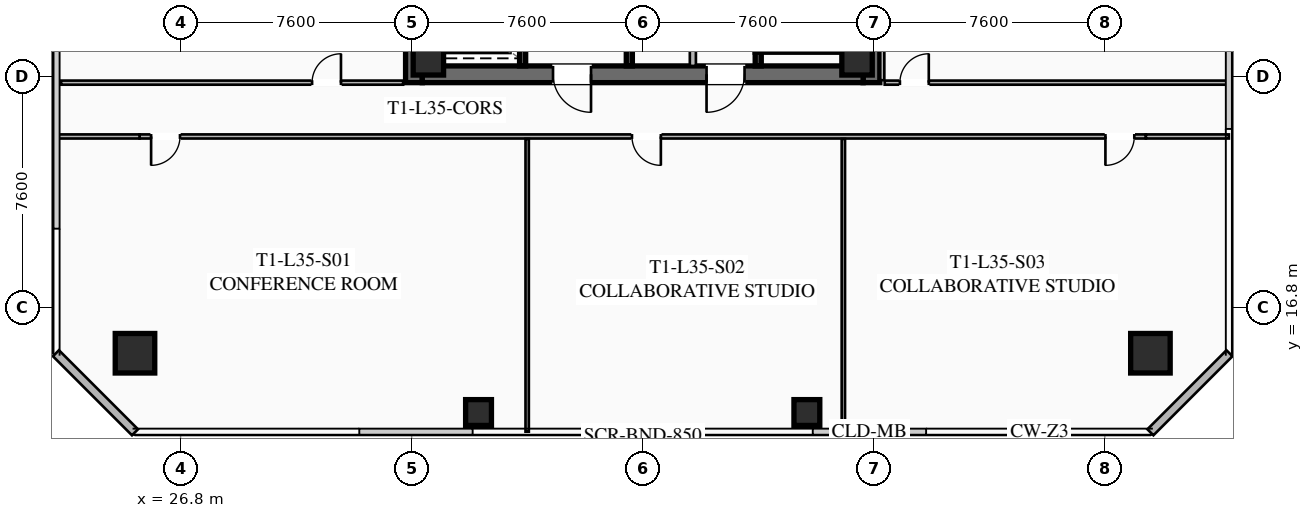
"""IFC4 building model, lengths in metres.
Left out: names, types, materials, properties, quantities, classifications, styles, units other than length and angle.
Written with IfcOpenShell. Run it as: python <this file> out.ifc"""

import sys

from ifc_helpers import new_model, si_unit, direction, frame, frame_2d, origin, origin_2d, place, context, subcontext, project, spatial, rectangle, hollow_rectangle, extrude, element, fill, save


model = new_model("IFC4")
c1 = context("Model", 3, precision=1e-05, world=origin(), true_north=direction((0.0, 1.0)))
c2 = subcontext(c1, "Body", "Model", "MODEL_VIEW")
j1 = project(units=[si_unit("LENGTHUNIT", "METRE"), si_unit("PLANEANGLEUNIT", "RADIAN")], contexts=[c1])
p1 = place(None, origin())
s1 = spatial("IfcSite", under=j1, at=p1, CompositionType="ELEMENT")
p2 = place(p1, origin())
s2 = spatial("IfcBuilding", under=s1, at=p2, CompositionType="ELEMENT")
p3 = place(p2, frame((0.0, 0.0, 132.15)))
s3 = spatial("IfcBuildingStorey", under=s2, at=p3, CompositionType="ELEMENT", Elevation=132.15)
for number, where, z_axis, x_axis in (
    (1, (34.475, 24.2, 0.0), (0.0, 0.0, 1.0), (0.0, 1.0, 0.0)),
    (2, (49.525, 39.8, 0.0), (0.0, 0.0, 1.0), (0.0, -1.0, 0.0)),
):
    element("IfcWall", number, at=place(p3, frame(where, z_axis=z_axis, x_axis=x_axis)), inside=s3, PredefinedType="SHEAR", context=c2, shape_type="SweptSolid", body=[
        extrude(rectangle(XDim=15.6, YDim=0.55, at=frame_2d((7.8, 0.0))), origin(), (0.0, 0.0, 1.0), 3.55),
    ])
p4 = place(p3, frame((49.25, 24.475, 0.0), z_axis=(0.0, 0.0, 1.0), x_axis=(-1.0, 0.0, 0.0)))
e3 = element("IfcWall", 3, at=p4, inside=s3, PredefinedType="SHEAR", context=c2, shape_type="SweptSolid", body=[
    extrude(rectangle(XDim=14.5, YDim=0.55, at=frame_2d((7.25, 0.0))), origin(), (0.0, 0.0, 1.0), 3.55),
])
p5 = place(p4, frame((8.95, 0.0, 0.0)))
e4 = element("IfcOpeningElement", 4, at=p5, cuts=e3, PredefinedType="OPENING", context=c2, shape_type="SweptSolid", body=[
    extrude(rectangle(XDim=1.25, YDim=2.25, at=frame_2d((0.625, 1.125))), frame((0.0, 0.285, 0.0), z_axis=(0.0, -1.0, 0.0), x_axis=(1.0, 0.0, 0.0)), (0.0, 0.0, 1.0), 0.57),
])
p6 = place(p4, frame((3.9, 0.0, 0.0)))
e5 = element("IfcOpeningElement", 5, at=p6, cuts=e3, PredefinedType="OPENING", context=c2, shape_type="SweptSolid", body=[
    extrude(rectangle(XDim=1.25, YDim=2.25, at=frame_2d((0.625, 1.125))), frame((0.0, 0.285, 0.0), z_axis=(0.0, -1.0, 0.0), x_axis=(1.0, 0.0, 0.0)), (0.0, 0.0, 1.0), 0.57),
])
for number, where, z_axis, x_axis in (
    (6, (34.95, 24.95, 0.0), (0.0, 0.0, 1.0), (1.0, 0.0, 0.0)),
    (7, (49.05, 24.95, 0.0), (0.0, 0.0, 1.0), (1.0, 0.0, 0.0)),
):
    element("IfcColumn", number, at=place(p3, frame(where, z_axis=z_axis, x_axis=x_axis)), inside=s3, PredefinedType="COLUMN", context=c2, shape_type="SweptSolid", body=[
        extrude(hollow_rectangle(XDim=1.0, YDim=1.0, WallThickness=0.04, at=origin_2d()), origin(), (0.0, 0.0, 1.0), 3.37),
    ])
for number, where, z_axis, x_axis in (
    (8, (25.3, 15.3, 0.0), (0.0, 0.0, 1.0), (1.0, 0.0, 0.0)),
    (9, (58.7, 15.3, 0.0), (0.0, 0.0, 1.0), (1.0, 0.0, 0.0)),
):
    element("IfcColumn", number, at=place(p3, frame(where, z_axis=z_axis, x_axis=x_axis)), inside=s3, PredefinedType="COLUMN", context=c2, shape_type="SweptSolid", body=[
        extrude(hollow_rectangle(XDim=1.3, YDim=1.3, WallThickness=0.05, at=origin_2d()), origin(), (0.0, 0.0, 1.0), 3.37),
    ])
for number, where, z_axis, x_axis in (
    (10, (36.6, 13.35, 0.0), (0.0, 0.0, 1.0), (1.0, 0.0, 0.0)),
    (11, (47.4, 13.35, 0.0), (0.0, 0.0, 1.0), (1.0, 0.0, 0.0)),
):
    element("IfcColumn", number, at=place(p3, frame(where, z_axis=z_axis, x_axis=x_axis)), inside=s3, PredefinedType="COLUMN", context=c2, shape_type="SweptSolid", body=[
        extrude(hollow_rectangle(XDim=0.85, YDim=0.85, WallThickness=0.035, at=origin_2d()), origin(), (0.0, 0.0, 1.0), 3.37),
    ])
for number, where, z_axis, x_axis in (
    (12, (25.3, 12.7, 0.0), (0.0, 0.0, 1.0), (-0.707, 0.707, 0.0)),
    (13, (61.3, 15.3, 0.0), (0.0, 0.0, 1.0), (-0.707, -0.707, 0.0)),
):
    element("IfcWall", number, at=place(p3, frame(where, z_axis=z_axis, x_axis=x_axis)), inside=s3, PredefinedType="SOLIDWALL", context=c2, shape_type="SweptSolid", body=[
        extrude(rectangle(XDim=3.677, YDim=0.28, at=frame_2d((1.838, 0.0))), origin(), (0.0, 0.0, 1.0), 3.37),
    ])
p7 = place(p3, frame((45.8, 32.8, 0.0), z_axis=(0.0, 0.0, 1.0), x_axis=(0.0, -1.0, 0.0)))
e14 = element("IfcWall", 14, at=p7, inside=s3, PredefinedType="SHEAR", context=c2, shape_type="SweptSolid", body=[
    extrude(rectangle(XDim=8.05, YDim=0.2, at=frame_2d((4.025, 0.0))), origin(), (0.0, 0.0, 1.0), 3.37),
])
p8 = place(p7, frame((0.45, 0.0, 0.0)))
e15 = element("IfcOpeningElement", 15, at=p8, cuts=e14, PredefinedType="OPENING", context=c2, shape_type="SweptSolid", body=[
    extrude(rectangle(XDim=1.15, YDim=2.2, at=frame_2d((0.575, 1.1))), frame((0.0, 0.11, 0.0), z_axis=(0.0, -1.0, 0.0), x_axis=(1.0, 0.0, 0.0)), (0.0, 0.0, 1.0), 0.22),
])
p9 = place(p3, frame((41.56, 24.75, 0.0), z_axis=(0.0, 0.0, 1.0), x_axis=(0.0, 1.0, 0.0)))
e16 = element("IfcWall", 16, at=p9, inside=s3, PredefinedType="SHEAR", context=c2, shape_type="SweptSolid", body=[
    extrude(rectangle(XDim=14.5, YDim=0.2, at=frame_2d((7.25, 0.0))), origin(), (0.0, 0.0, 1.0), 3.37),
])
p10 = place(p3, frame((38.05, 24.75, 0.0), z_axis=(0.0, 0.0, 1.0), x_axis=(0.0, 1.0, 0.0)))
e17 = element("IfcWall", 17, at=p10, inside=s3, PredefinedType="SHEAR", context=c2, shape_type="SweptSolid", body=[
    extrude(rectangle(XDim=6.45, YDim=0.2, at=frame_2d((3.225, 0.0))), origin(), (0.0, 0.0, 1.0), 3.37),
])
p11 = place(p10, frame((4.875, 0.0, 0.0)))
e18 = element("IfcOpeningElement", 18, at=p11, cuts=e17, PredefinedType="OPENING", context=c2, shape_type="SweptSolid", body=[
    extrude(rectangle(XDim=1.3, YDim=2.25, at=frame_2d((0.65, 1.125))), frame((0.0, 0.11, 0.0), z_axis=(0.0, -1.0, 0.0), x_axis=(1.0, 0.0, 0.0)), (0.0, 0.0, 1.0), 0.22),
])
p12 = place(p10, frame((2.875, 0.0, 0.0)))
e19 = element("IfcOpeningElement", 19, at=p12, cuts=e17, PredefinedType="OPENING", context=c2, shape_type="SweptSolid", body=[
    extrude(rectangle(XDim=1.3, YDim=2.25, at=frame_2d((0.65, 1.125))), frame((0.0, 0.11, 0.0), z_axis=(0.0, -1.0, 0.0), x_axis=(1.0, 0.0, 0.0)), (0.0, 0.0, 1.0), 0.22),
])
p13 = place(p10, frame((0.675, 0.0, 0.0)))
e20 = element("IfcOpeningElement", 20, at=p13, cuts=e17, PredefinedType="OPENING", context=c2, shape_type="SweptSolid", body=[
    extrude(rectangle(XDim=1.3, YDim=2.25, at=frame_2d((0.65, 1.125))), frame((0.0, 0.11, 0.0), z_axis=(0.0, -1.0, 0.0), x_axis=(1.0, 0.0, 0.0)), (0.0, 0.0, 1.0), 0.22),
])
p14 = place(p3, frame((43.65, 24.75, 0.0), z_axis=(0.0, 0.0, 1.0), x_axis=(0.0, 1.0, 0.0)))
e21 = element("IfcWall", 21, at=p14, inside=s3, PredefinedType="SOLIDWALL", context=c2, shape_type="SweptSolid", body=[
    extrude(rectangle(XDim=6.9, YDim=0.2, at=frame_2d((3.45, 0.0))), origin(), (0.0, 0.0, 1.0), 2.723),
])
p15 = place(p14, frame((0.85, 0.0, 0.0)))
e22 = element("IfcOpeningElement", 22, at=p15, cuts=e21, PredefinedType="OPENING", context=c2, shape_type="SweptSolid", body=[
    extrude(rectangle(XDim=0.95, YDim=2.05, at=frame_2d((0.475, 1.025))), frame((0.0, 0.11, 0.0), z_axis=(0.0, -1.0, 0.0), x_axis=(1.0, 0.0, 0.0)), (0.0, 0.0, 1.0), 0.22),
])
p16 = place(p14, frame((4.8, 0.0, 0.0)))
e23 = element("IfcOpeningElement", 23, at=p16, cuts=e21, PredefinedType="OPENING", context=c2, shape_type="SweptSolid", body=[
    extrude(rectangle(XDim=1.05, YDim=2.2, at=frame_2d((0.525, 1.1))), frame((0.0, 0.11, 0.0), z_axis=(0.0, -1.0, 0.0), x_axis=(1.0, 0.0, 0.0)), (0.0, 0.0, 1.0), 0.22),
])
p17 = place(p3, frame((58.55, 22.43, 0.0), z_axis=(0.0, 0.0, 1.0), x_axis=(-1.0, 0.0, 0.0)))
e24 = element("IfcWall", 24, at=p17, inside=s3, PredefinedType="PARTITIONING", context=c2, shape_type="SweptSolid", body=[
    extrude(rectangle(XDim=33.1, YDim=0.135, at=frame_2d((16.55, 0.0))), origin(), (0.0, 0.0, 1.0), 2.723),
])
p18 = place(p17, frame((31.77, 0.0, 0.0)))
e25 = element("IfcOpeningElement", 25, at=p18, cuts=e24, PredefinedType="OPENING", context=c2, shape_type="SweptSolid", body=[
    extrude(rectangle(XDim=0.95, YDim=2.05, at=frame_2d((0.475, 1.025))), frame((0.0, 0.077, 0.0), z_axis=(0.0, -1.0, 0.0), x_axis=(1.0, 0.0, 0.0)), (0.0, 0.0, 1.0), 0.155),
])
p19 = place(p17, frame((15.953, 0.0, 0.0)))
e26 = element("IfcOpeningElement", 26, at=p19, cuts=e24, PredefinedType="OPENING", context=c2, shape_type="SweptSolid", body=[
    extrude(rectangle(XDim=0.95, YDim=2.05, at=frame_2d((0.475, 1.025))), frame((0.0, 0.077, 0.0), z_axis=(0.0, -1.0, 0.0), x_axis=(1.0, 0.0, 0.0)), (0.0, 0.0, 1.0), 0.155),
])
p20 = place(p17, frame((0.38, 0.0, 0.0)))
e27 = element("IfcOpeningElement", 27, at=p20, cuts=e24, PredefinedType="OPENING", context=c2, shape_type="SweptSolid", body=[
    extrude(rectangle(XDim=0.95, YDim=2.05, at=frame_2d((0.475, 1.025))), frame((0.0, 0.077, 0.0), z_axis=(0.0, -1.0, 0.0), x_axis=(1.0, 0.0, 0.0)), (0.0, 0.0, 1.0), 0.155),
])
for number, where, z_axis, x_axis in (
    (28, (22.72, 22.43, 0.0), (0.0, 0.0, 1.0), (1.0, 0.0, 0.0)),
    (29, (58.55, 22.43, 0.0), (0.0, 0.0, 1.0), (1.0, 0.0, 0.0)),
):
    element("IfcWall", number, at=place(p3, frame(where, z_axis=z_axis, x_axis=x_axis)), inside=s3, PredefinedType="PARTITIONING", context=c2, shape_type="SweptSolid", body=[
        extrude(rectangle(XDim=2.73, YDim=0.135, at=frame_2d((1.365, 0.0))), origin(), (0.0, 0.0, 1.0), 2.723),
    ])
for number, where, z_axis, x_axis in (
    (30, (38.2, 12.72, 0.0), (0.0, 0.0, 1.0), (0.0, 1.0, 0.0)),
    (31, (48.6, 12.72, 0.0), (0.0, 0.0, 1.0), (0.0, 1.0, 0.0)),
):
    element("IfcWall", number, at=place(p3, frame(where, z_axis=z_axis, x_axis=x_axis)), inside=s3, PredefinedType="PARTITIONING", context=c2, shape_type="SweptSolid", body=[
        extrude(rectangle(XDim=9.63, YDim=0.11, at=frame_2d((4.815, 0.0))), origin(), (0.0, 0.0, 1.0), 2.723),
    ])
p21 = place(p3, frame((49.88, 39.72, 0.0), z_axis=(0.0, 0.0, 1.0), x_axis=(0.0, -1.0, 0.0)))
e32 = element("IfcWall", 32, at=p21, inside=s3, PredefinedType="PARTITIONING", context=c2, shape_type="SweptSolid", body=[
    extrude(rectangle(XDim=15.44, YDim=0.135, at=frame_2d((7.72, 0.0))), origin(), (0.0, 0.0, 1.0), 2.723),
])
p22 = place(p3, frame((49.96, 24.2, 0.0), z_axis=(0.0, 0.0, 1.0), x_axis=(1.0, 0.0, 0.0)))
e33 = element("IfcWall", 33, at=p22, inside=s3, PredefinedType="PARTITIONING", context=c2, shape_type="SweptSolid", body=[
    extrude(rectangle(XDim=11.32, YDim=0.135, at=frame_2d((5.66, 0.0))), origin(), (0.0, 0.0, 1.0), 2.723),
])
p23 = place(p22, frame((0.5, 0.0, 0.0)))
e34 = element("IfcOpeningElement", 34, at=p23, cuts=e33, PredefinedType="OPENING", context=c2, shape_type="SweptSolid", body=[
    extrude(rectangle(XDim=0.95, YDim=2.05, at=frame_2d((0.475, 1.025))), frame((0.0, 0.077, 0.0), z_axis=(0.0, -1.0, 0.0), x_axis=(1.0, 0.0, 0.0)), (0.0, 0.0, 1.0), 0.155),
])
p24 = place(p3, frame((22.87, 24.2, 0.0), z_axis=(0.0, 0.0, 1.0), x_axis=(1.0, 0.0, 0.0)))
e35 = element("IfcWall", 35, at=p24, inside=s3, PredefinedType="PARTITIONING", context=c2, shape_type="SweptSolid", body=[
    extrude(rectangle(XDim=11.25, YDim=0.135, at=frame_2d((5.625, 0.0))), origin(), (0.0, 0.0, 1.0), 2.723),
])
p25 = place(p24, frame((8.255, 0.0, 0.0)))
e36 = element("IfcOpeningElement", 36, at=p25, cuts=e35, PredefinedType="OPENING", context=c2, shape_type="SweptSolid", body=[
    extrude(rectangle(XDim=0.95, YDim=2.05, at=frame_2d((0.475, 1.025))), frame((0.0, 0.077, 0.0), z_axis=(0.0, -1.0, 0.0), x_axis=(1.0, 0.0, 0.0)), (0.0, 0.0, 1.0), 0.155),
])
p26 = place(p5, origin())
e37 = element("IfcDoor", 37, at=p26, inside=s3, OperationType="SINGLE_SWING_LEFT", PredefinedType="DOOR", context=c2, shape_type="SweptSolid", body=[
    extrude(rectangle(XDim=1.25, YDim=2.25, at=frame_2d((0.625, 1.125))), frame((0.0, 0.025, 0.0), z_axis=(0.0, -1.0, 0.0), x_axis=(1.0, 0.0, 0.0)), (0.0, 0.0, 1.0), 0.05),
])
fill(e4, e37)
p27 = place(p6, origin())
e38 = element("IfcDoor", 38, at=p27, inside=s3, OperationType="SINGLE_SWING_RIGHT", PredefinedType="DOOR", context=c2, shape_type="SweptSolid", body=[
    extrude(rectangle(XDim=1.25, YDim=2.25, at=frame_2d((0.625, 1.125))), frame((0.0, 0.025, 0.0), z_axis=(0.0, -1.0, 0.0), x_axis=(1.0, 0.0, 0.0)), (0.0, 0.0, 1.0), 0.05),
])
fill(e5, e38)
p28 = place(p18, origin())
e39 = element("IfcDoor", 39, at=p28, inside=s3, OperationType="SINGLE_SWING_RIGHT", PredefinedType="DOOR", context=c2, shape_type="SweptSolid", body=[
    extrude(rectangle(XDim=0.95, YDim=2.05, at=frame_2d((0.475, 1.025))), frame((0.0, 0.025, 0.0), z_axis=(0.0, -1.0, 0.0), x_axis=(1.0, 0.0, 0.0)), (0.0, 0.0, 1.0), 0.05),
])
fill(e25, e39)
p29 = place(p19, origin())
e40 = element("IfcDoor", 40, at=p29, inside=s3, OperationType="SINGLE_SWING_LEFT", PredefinedType="DOOR", context=c2, shape_type="SweptSolid", body=[
    extrude(rectangle(XDim=0.95, YDim=2.05, at=frame_2d((0.475, 1.025))), frame((0.0, 0.025, 0.0), z_axis=(0.0, -1.0, 0.0), x_axis=(1.0, 0.0, 0.0)), (0.0, 0.0, 1.0), 0.05),
])
fill(e26, e40)
p30 = place(p20, origin())
e41 = element("IfcDoor", 41, at=p30, inside=s3, OperationType="SINGLE_SWING_RIGHT", PredefinedType="DOOR", context=c2, shape_type="SweptSolid", body=[
    extrude(rectangle(XDim=0.95, YDim=2.05, at=frame_2d((0.475, 1.025))), frame((0.0, 0.025, 0.0), z_axis=(0.0, -1.0, 0.0), x_axis=(1.0, 0.0, 0.0)), (0.0, 0.0, 1.0), 0.05),
])
fill(e27, e41)
p31 = place(p23, origin())
e42 = element("IfcDoor", 42, at=p31, inside=s3, OperationType="SINGLE_SWING_RIGHT", PredefinedType="DOOR", context=c2, shape_type="SweptSolid", body=[
    extrude(rectangle(XDim=0.95, YDim=2.05, at=frame_2d((0.475, 1.025))), frame((0.0, 0.025, 0.0), z_axis=(0.0, -1.0, 0.0), x_axis=(1.0, 0.0, 0.0)), (0.0, 0.0, 1.0), 0.05),
])
fill(e34, e42)
p32 = place(p25, origin())
e43 = element("IfcDoor", 43, at=p32, inside=s3, OperationType="SINGLE_SWING_RIGHT", PredefinedType="DOOR", context=c2, shape_type="SweptSolid", body=[
    extrude(rectangle(XDim=0.95, YDim=2.05, at=frame_2d((0.475, 1.025))), frame((0.0, 0.025, 0.0), z_axis=(0.0, -1.0, 0.0), x_axis=(1.0, 0.0, 0.0)), (0.0, 0.0, 1.0), 0.05),
])
fill(e36, e43)
save(model, sys.argv[1])
